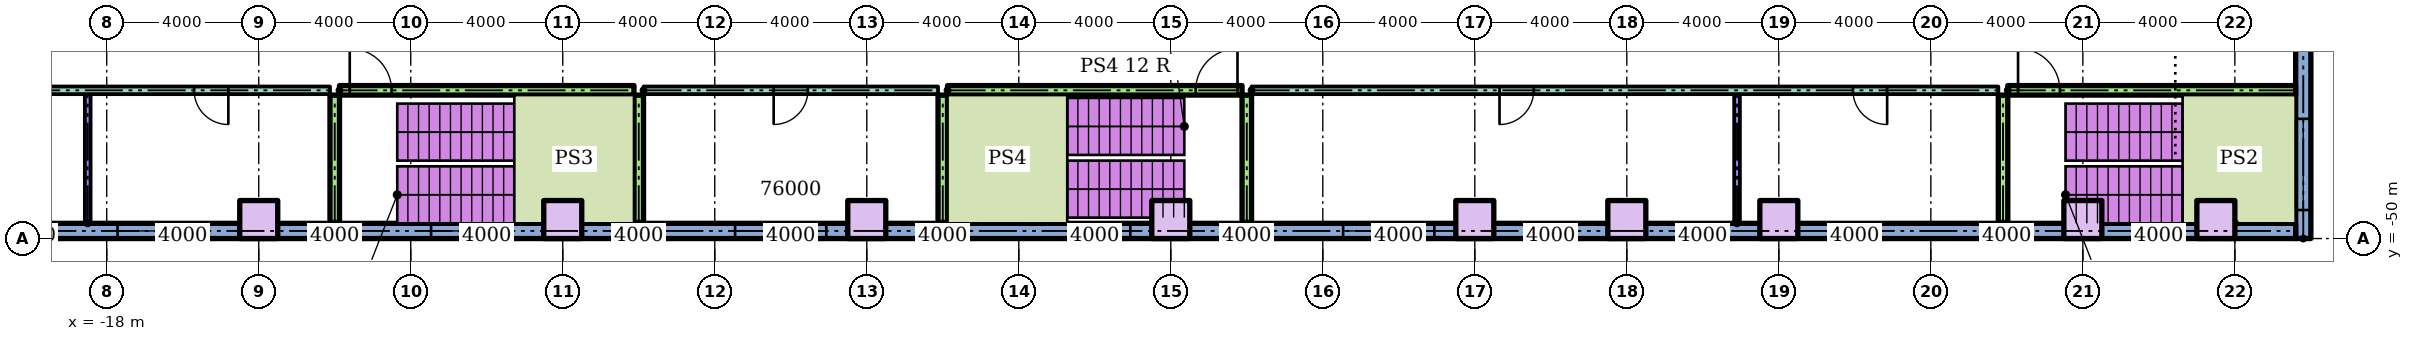
"""IFC4 building model, lengths in metres.
Left out: names, types, materials, properties, quantities, classifications, styles, units other than length and angle.
Written with IfcOpenShell. Run it as: python <this file> out.ifc"""

import sys

from ifc_helpers import new_model, si_unit, direction, frame, frame_2d, origin, origin_2d, place, context, subcontext, project, spatial, rectangle, extrude, element, fill, save


model = new_model("IFC4")
c1 = context("Model", 3, precision=1e-05, world=origin(), true_north=direction((0.0, 1.0)))
c2 = subcontext(c1, "Body", "Model", "MODEL_VIEW")
j1 = project(units=[si_unit("LENGTHUNIT", "METRE"), si_unit("PLANEANGLEUNIT", "RADIAN")], contexts=[c1])
p1 = place(None, origin())
s1 = spatial("IfcSite", under=j1, at=p1, CompositionType="ELEMENT")
p2 = place(p1, origin())
s2 = spatial("IfcBuilding", under=s1, at=p2, CompositionType="ELEMENT")
p3 = place(p2, frame((0.0, 0.0, 14.0)))
s3 = spatial("IfcBuildingStorey", under=s2, at=p3, CompositionType="ELEMENT", Elevation=14.0)
for number, where in (
    (1, (-14.0, -49.5, 0.0)),
    (2, (-6.0, -49.5, 0.0)),
    (3, (2.0, -49.5, 0.0)),
    (4, (10.0, -49.5, 0.0)),
    (5, (18.0, -49.5, 0.0)),
    (6, (22.0, -49.5, 0.0)),
    (7, (26.0, -49.5, 0.0)),
    (8, (34.0, -49.5, 0.0)),
    (9, (37.5, -49.5, 0.0)),
):
    element("IfcColumn", number, at=place(p3, frame(where)), inside=s3, PredefinedType="COLUMN", context=c2, shape_type="SweptSolid", body=[
        extrude(rectangle(XDim=1.0, YDim=1.0, at=origin_2d()), origin(), (0.0, 0.0, 1.0), 4.0),
    ])
p4 = place(p3, frame((39.8, -50.0, 0.0), z_axis=(0.0, 0.0, 1.0), x_axis=(0.0, 1.0, 0.0)))
e10 = element("IfcWall", 10, at=p4, inside=s3, PredefinedType="STANDARD", context=c2, shape_type="SweptSolid", body=[
    extrude(rectangle(XDim=70.0, YDim=0.4, at=frame_2d((35.0, 0.0))), origin(), (0.0, 0.0, 1.0), 3.7),
])
p5 = place(p4, frame((0.75, 0.0, 0.9)))
e11 = element("IfcOpeningElement", 11, at=p5, cuts=e10, PredefinedType="OPENING", context=c2, shape_type="SweptSolid", body=[
    extrude(rectangle(XDim=2.4, YDim=2.1, at=frame_2d((1.2, 1.05))), frame((0.0, 0.21, 0.0), z_axis=(0.0, -1.0, 0.0), x_axis=(1.0, 0.0, 0.0)), (0.0, 0.0, 1.0), 0.42),
])
p6 = place(p4, frame((28.863, 0.0, 0.9)))
e12 = element("IfcOpeningElement", 12, at=p6, cuts=e10, PredefinedType="OPENING", context=c2, shape_type="SweptSolid", body=[
    extrude(rectangle(XDim=2.4, YDim=2.1, at=frame_2d((1.2, 1.05))), frame((0.0, 0.21, 0.0), z_axis=(0.0, -1.0, 0.0), x_axis=(1.0, 0.0, 0.0)), (0.0, 0.0, 1.0), 0.42),
])
p7 = place(p4, frame((32.988, 0.0, 0.9)))
e13 = element("IfcOpeningElement", 13, at=p7, cuts=e10, PredefinedType="OPENING", context=c2, shape_type="SweptSolid", body=[
    extrude(rectangle(XDim=2.4, YDim=2.1, at=frame_2d((1.2, 1.05))), frame((0.0, 0.21, 0.0), z_axis=(0.0, -1.0, 0.0), x_axis=(1.0, 0.0, 0.0)), (0.0, 0.0, 1.0), 0.42),
])
p8 = place(p4, frame((37.113, 0.0, 0.9)))
e14 = element("IfcOpeningElement", 14, at=p8, cuts=e10, PredefinedType="OPENING", context=c2, shape_type="SweptSolid", body=[
    extrude(rectangle(XDim=2.4, YDim=2.1, at=frame_2d((1.2, 1.05))), frame((0.0, 0.21, 0.0), z_axis=(0.0, -1.0, 0.0), x_axis=(1.0, 0.0, 0.0)), (0.0, 0.0, 1.0), 0.42),
])
p9 = place(p4, frame((41.238, 0.0, 0.9)))
e15 = element("IfcOpeningElement", 15, at=p9, cuts=e10, PredefinedType="OPENING", context=c2, shape_type="SweptSolid", body=[
    extrude(rectangle(XDim=2.4, YDim=2.1, at=frame_2d((1.2, 1.05))), frame((0.0, 0.21, 0.0), z_axis=(0.0, -1.0, 0.0), x_axis=(1.0, 0.0, 0.0)), (0.0, 0.0, 1.0), 0.42),
])
p10 = place(p4, frame((45.363, 0.0, 0.9)))
e16 = element("IfcOpeningElement", 16, at=p10, cuts=e10, PredefinedType="OPENING", context=c2, shape_type="SweptSolid", body=[
    extrude(rectangle(XDim=2.4, YDim=2.1, at=frame_2d((1.2, 1.05))), frame((0.0, 0.21, 0.0), z_axis=(0.0, -1.0, 0.0), x_axis=(1.0, 0.0, 0.0)), (0.0, 0.0, 1.0), 0.42),
])
p11 = place(p4, frame((49.488, 0.0, 0.9)))
e17 = element("IfcOpeningElement", 17, at=p11, cuts=e10, PredefinedType="OPENING", context=c2, shape_type="SweptSolid", body=[
    extrude(rectangle(XDim=2.4, YDim=2.1, at=frame_2d((1.2, 1.05))), frame((0.0, 0.21, 0.0), z_axis=(0.0, -1.0, 0.0), x_axis=(1.0, 0.0, 0.0)), (0.0, 0.0, 1.0), 0.42),
])
p12 = place(p4, frame((53.613, 0.0, 0.9)))
e18 = element("IfcOpeningElement", 18, at=p12, cuts=e10, PredefinedType="OPENING", context=c2, shape_type="SweptSolid", body=[
    extrude(rectangle(XDim=2.4, YDim=2.1, at=frame_2d((1.2, 1.05))), frame((0.0, 0.21, 0.0), z_axis=(0.0, -1.0, 0.0), x_axis=(1.0, 0.0, 0.0)), (0.0, 0.0, 1.0), 0.42),
])
p13 = place(p4, frame((57.738, 0.0, 0.9)))
e19 = element("IfcOpeningElement", 19, at=p13, cuts=e10, PredefinedType="OPENING", context=c2, shape_type="SweptSolid", body=[
    extrude(rectangle(XDim=2.4, YDim=2.1, at=frame_2d((1.2, 1.05))), frame((0.0, 0.21, 0.0), z_axis=(0.0, -1.0, 0.0), x_axis=(1.0, 0.0, 0.0)), (0.0, 0.0, 1.0), 0.42),
])
p14 = place(p4, frame((62.05, 0.0, 0.9)))
e20 = element("IfcOpeningElement", 20, at=p14, cuts=e10, PredefinedType="OPENING", context=c2, shape_type="SweptSolid", body=[
    extrude(rectangle(XDim=2.4, YDim=2.1, at=frame_2d((1.2, 1.05))), frame((0.0, 0.21, 0.0), z_axis=(0.0, -1.0, 0.0), x_axis=(1.0, 0.0, 0.0)), (0.0, 0.0, 1.0), 0.42),
])
p15 = place(p4, frame((66.55, 0.0, 0.9)))
e21 = element("IfcOpeningElement", 21, at=p15, cuts=e10, PredefinedType="OPENING", context=c2, shape_type="SweptSolid", body=[
    extrude(rectangle(XDim=2.4, YDim=2.1, at=frame_2d((1.2, 1.05))), frame((0.0, 0.21, 0.0), z_axis=(0.0, -1.0, 0.0), x_axis=(1.0, 0.0, 0.0)), (0.0, 0.0, 1.0), 0.42),
])
p16 = place(p3, frame((-39.6, -49.8, 0.0)))
e22 = element("IfcWall", 22, at=p16, inside=s3, PredefinedType="STANDARD", context=c2, shape_type="SweptSolid", body=[
    extrude(rectangle(XDim=79.2, YDim=0.4, at=frame_2d((39.6, 0.0))), origin(), (0.0, 0.0, 1.0), 3.7),
])
p17 = place(p16, frame((21.885, 0.0, 0.9)))
e23 = element("IfcOpeningElement", 23, at=p17, cuts=e22, PredefinedType="OPENING", context=c2, shape_type="SweptSolid", body=[
    extrude(rectangle(XDim=2.4, YDim=2.1, at=frame_2d((1.2, 1.05))), frame((0.0, 0.21, 0.0), z_axis=(0.0, -1.0, 0.0), x_axis=(1.0, 0.0, 0.0)), (0.0, 0.0, 1.0), 0.42),
])
p18 = place(p16, frame((30.135, 0.0, 0.9)))
e24 = element("IfcOpeningElement", 24, at=p18, cuts=e22, PredefinedType="OPENING", context=c2, shape_type="SweptSolid", body=[
    extrude(rectangle(XDim=2.05, YDim=2.1, at=frame_2d((1.025, 1.05))), frame((0.0, 0.21, 0.0), z_axis=(0.0, -1.0, 0.0), x_axis=(1.0, 0.0, 0.0)), (0.0, 0.0, 1.0), 0.42),
])
p19 = place(p16, frame((38.135, 0.0, 0.9)))
e25 = element("IfcOpeningElement", 25, at=p19, cuts=e22, PredefinedType="OPENING", context=c2, shape_type="SweptSolid", body=[
    extrude(rectangle(XDim=2.4, YDim=2.1, at=frame_2d((1.2, 1.05))), frame((0.0, 0.21, 0.0), z_axis=(0.0, -1.0, 0.0), x_axis=(1.0, 0.0, 0.0)), (0.0, 0.0, 1.0), 0.42),
])
p20 = place(p16, frame((47.015, 0.0, 0.9)))
e26 = element("IfcOpeningElement", 26, at=p20, cuts=e22, PredefinedType="OPENING", context=c2, shape_type="SweptSolid", body=[
    extrude(rectangle(XDim=1.52, YDim=2.1, at=frame_2d((0.76, 1.05))), frame((0.0, 0.21, 0.0), z_axis=(0.0, -1.0, 0.0), x_axis=(1.0, 0.0, 0.0)), (0.0, 0.0, 1.0), 0.42),
])
p21 = place(p16, frame((54.135, 0.0, 0.9)))
e27 = element("IfcOpeningElement", 27, at=p21, cuts=e22, PredefinedType="OPENING", context=c2, shape_type="SweptSolid", body=[
    extrude(rectangle(XDim=2.4, YDim=2.1, at=frame_2d((1.2, 1.05))), frame((0.0, 0.21, 0.0), z_axis=(0.0, -1.0, 0.0), x_axis=(1.0, 0.0, 0.0)), (0.0, 0.0, 1.0), 0.42),
])
p22 = place(p3, frame((-31.775, -46.1, 0.0)))
e28 = element("IfcWall", 28, at=p22, inside=s3, PredefinedType="PARTITIONING", context=c2, shape_type="SweptSolid", body=[
    extrude(rectangle(XDim=19.65, YDim=0.2, at=frame_2d((9.825, 0.0))), origin(), (0.0, 0.0, 1.0), 3.7),
])
p23 = place(p22, frame((2.875, 0.0, 0.0)))
e29 = element("IfcOpeningElement", 29, at=p23, cuts=e28, PredefinedType="OPENING", context=c2, shape_type="SweptSolid", body=[
    extrude(rectangle(XDim=0.9, YDim=2.1, at=frame_2d((0.45, 1.05))), frame((0.0, 0.11, 0.0), z_axis=(0.0, -1.0, 0.0), x_axis=(1.0, 0.0, 0.0)), (0.0, 0.0, 1.0), 0.22),
])
p24 = place(p22, frame((10.425, 0.0, 0.0)))
e30 = element("IfcOpeningElement", 30, at=p24, cuts=e28, PredefinedType="OPENING", context=c2, shape_type="SweptSolid", body=[
    extrude(rectangle(XDim=0.9, YDim=2.1, at=frame_2d((0.45, 1.05))), frame((0.0, 0.11, 0.0), z_axis=(0.0, -1.0, 0.0), x_axis=(1.0, 0.0, 0.0)), (0.0, 0.0, 1.0), 0.22),
])
p25 = place(p22, frame((16.075, 0.0, 0.0)))
e31 = element("IfcOpeningElement", 31, at=p25, cuts=e28, PredefinedType="OPENING", context=c2, shape_type="SweptSolid", body=[
    extrude(rectangle(XDim=0.9, YDim=2.1, at=frame_2d((0.45, 1.05))), frame((0.0, 0.11, 0.0), z_axis=(0.0, -1.0, 0.0), x_axis=(1.0, 0.0, 0.0)), (0.0, 0.0, 1.0), 0.22),
])
p26 = place(p3, frame((-3.875, -46.1, 0.0)))
e32 = element("IfcWall", 32, at=p26, inside=s3, PredefinedType="PARTITIONING", context=c2, shape_type="SweptSolid", body=[
    extrude(rectangle(XDim=7.75, YDim=0.2, at=frame_2d((3.875, 0.0))), origin(), (0.0, 0.0, 1.0), 3.7),
])
p27 = place(p26, frame((3.425, 0.0, 0.0)))
e33 = element("IfcOpeningElement", 33, at=p27, cuts=e32, PredefinedType="OPENING", context=c2, shape_type="SweptSolid", body=[
    extrude(rectangle(XDim=0.9, YDim=2.1, at=frame_2d((0.45, 1.05))), frame((0.0, 0.11, 0.0), z_axis=(0.0, -1.0, 0.0), x_axis=(1.0, 0.0, 0.0)), (0.0, 0.0, 1.0), 0.22),
])
p28 = place(p3, frame((12.125, -46.1, 0.0)))
e34 = element("IfcWall", 34, at=p28, inside=s3, PredefinedType="PARTITIONING", context=c2, shape_type="SweptSolid", body=[
    extrude(rectangle(XDim=19.65, YDim=0.2, at=frame_2d((9.825, 0.0))), origin(), (0.0, 0.0, 1.0), 3.7),
])
p29 = place(p28, frame((6.525, 0.0, 0.0)))
e35 = element("IfcOpeningElement", 35, at=p29, cuts=e34, PredefinedType="OPENING", context=c2, shape_type="SweptSolid", body=[
    extrude(rectangle(XDim=0.9, YDim=2.1, at=frame_2d((0.45, 1.05))), frame((0.0, 0.11, 0.0), z_axis=(0.0, -1.0, 0.0), x_axis=(1.0, 0.0, 0.0)), (0.0, 0.0, 1.0), 0.22),
])
p30 = place(p28, frame((15.825, 0.0, 0.0)))
e36 = element("IfcOpeningElement", 36, at=p30, cuts=e34, PredefinedType="OPENING", context=c2, shape_type="SweptSolid", body=[
    extrude(rectangle(XDim=0.9, YDim=2.1, at=frame_2d((0.45, 1.05))), frame((0.0, 0.11, 0.0), z_axis=(0.0, -1.0, 0.0), x_axis=(1.0, 0.0, 0.0)), (0.0, 0.0, 1.0), 0.22),
])
p31 = place(p3, frame((-11.875, -46.1, 0.0)))
e37 = element("IfcWall", 37, at=p31, inside=s3, PredefinedType="SOLIDWALL", context=c2, shape_type="SweptSolid", body=[
    extrude(rectangle(XDim=7.75, YDim=0.25, at=frame_2d((3.875, 0.0))), origin(), (0.0, 0.0, 1.0), 3.7),
])
p32 = place(p31, frame((0.27, 0.0, 0.0)))
e38 = element("IfcOpeningElement", 38, at=p32, cuts=e37, PredefinedType="OPENING", context=c2, shape_type="SweptSolid", body=[
    extrude(rectangle(XDim=1.1, YDim=2.1, at=frame_2d((0.55, 1.05))), frame((0.0, 0.135, 0.0), z_axis=(0.0, -1.0, 0.0), x_axis=(1.0, 0.0, 0.0)), (0.0, 0.0, 1.0), 0.27),
])
p33 = place(p3, frame((4.125, -46.1, 0.0)))
e39 = element("IfcWall", 39, at=p33, inside=s3, PredefinedType="SOLIDWALL", context=c2, shape_type="SweptSolid", body=[
    extrude(rectangle(XDim=7.75, YDim=0.25, at=frame_2d((3.875, 0.0))), origin(), (0.0, 0.0, 1.0), 3.7),
])
p34 = place(p33, frame((6.53, 0.0, 0.0)))
e40 = element("IfcOpeningElement", 40, at=p34, cuts=e39, PredefinedType="OPENING", context=c2, shape_type="SweptSolid", body=[
    extrude(rectangle(XDim=1.1, YDim=2.1, at=frame_2d((0.55, 1.05))), frame((0.0, 0.135, 0.0), z_axis=(0.0, -1.0, 0.0), x_axis=(1.0, 0.0, 0.0)), (0.0, 0.0, 1.0), 0.27),
])
p35 = place(p3, frame((32.025, -46.1, 0.0)))
e41 = element("IfcWall", 41, at=p35, inside=s3, PredefinedType="SOLIDWALL", context=c2, shape_type="SweptSolid", body=[
    extrude(rectangle(XDim=7.575, YDim=0.25, at=frame_2d((3.788, 0.0))), origin(), (0.0, 0.0, 1.0), 3.7),
])
p36 = place(p35, frame((0.27, 0.0, 0.0)))
e42 = element("IfcOpeningElement", 42, at=p36, cuts=e41, PredefinedType="OPENING", context=c2, shape_type="SweptSolid", body=[
    extrude(rectangle(XDim=1.1, YDim=2.1, at=frame_2d((0.55, 1.05))), frame((0.0, 0.135, 0.0), z_axis=(0.0, -1.0, 0.0), x_axis=(1.0, 0.0, 0.0)), (0.0, 0.0, 1.0), 0.27),
])
p37 = place(p3, frame((-18.5, -49.6, 0.0), z_axis=(0.0, 0.0, 1.0), x_axis=(0.0, 1.0, 0.0)))
e43 = element("IfcWall", 43, at=p37, inside=s3, PredefinedType="PARTITIONING", context=c2, shape_type="SweptSolid", body=[
    extrude(rectangle(XDim=3.4, YDim=0.15, at=frame_2d((1.7, 0.0))), origin(), (0.0, 0.0, 1.0), 3.7),
])
for number, where, z_axis, x_axis in (
    (44, (-12.0, -49.6, 0.0), (0.0, 0.0, 1.0), (0.0, 1.0, 0.0)),
    (45, (-4.0, -49.6, 0.0), (0.0, 0.0, 1.0), (0.0, 1.0, 0.0)),
    (46, (4.0, -49.6, 0.0), (0.0, 0.0, 1.0), (0.0, 1.0, 0.0)),
    (47, (12.0, -49.6, 0.0), (0.0, 0.0, 1.0), (0.0, 1.0, 0.0)),
):
    element("IfcWall", number, at=place(p3, frame(where, z_axis=z_axis, x_axis=x_axis)), inside=s3, PredefinedType="SOLIDWALL", context=c2, shape_type="SweptSolid", body=[
        extrude(rectangle(XDim=3.375, YDim=0.25, at=frame_2d((1.688, 0.0))), origin(), (0.0, 0.0, 1.0), 3.7),
    ])
p38 = place(p3, frame((24.9, -49.6, 0.0), z_axis=(0.0, 0.0, 1.0), x_axis=(0.0, 1.0, 0.0)))
e48 = element("IfcWall", 48, at=p38, inside=s3, PredefinedType="PARTITIONING", context=c2, shape_type="SweptSolid", body=[
    extrude(rectangle(XDim=3.4, YDim=0.15, at=frame_2d((1.7, 0.0))), origin(), (0.0, 0.0, 1.0), 3.7),
])
p39 = place(p3, frame((31.9, -49.6, 0.0), z_axis=(0.0, 0.0, 1.0), x_axis=(0.0, 1.0, 0.0)))
e49 = element("IfcWall", 49, at=p39, inside=s3, PredefinedType="SOLIDWALL", context=c2, shape_type="SweptSolid", body=[
    extrude(rectangle(XDim=3.375, YDim=0.25, at=frame_2d((1.688, 0.0))), origin(), (0.0, 0.0, 1.0), 3.7),
])
p40 = place(p5, origin())
e50 = element("IfcWindow", 50, at=p40, inside=s3, PartitioningType="SINGLE_PANEL", PredefinedType="WINDOW", context=c2, shape_type="SweptSolid", body=[
    extrude(rectangle(XDim=2.4, YDim=2.1, at=frame_2d((1.2, 1.05))), frame((0.0, 0.03, 0.0), z_axis=(0.0, -1.0, 0.0), x_axis=(1.0, 0.0, 0.0)), (0.0, 0.0, 1.0), 0.06),
])
fill(e11, e50)
p41 = place(p17, origin())
e51 = element("IfcWindow", 51, at=p41, inside=s3, PartitioningType="SINGLE_PANEL", PredefinedType="WINDOW", context=c2, shape_type="SweptSolid", body=[
    extrude(rectangle(XDim=2.4, YDim=2.1, at=frame_2d((1.2, 1.05))), frame((0.0, 0.03, 0.0), z_axis=(0.0, -1.0, 0.0), x_axis=(1.0, 0.0, 0.0)), (0.0, 0.0, 1.0), 0.06),
])
fill(e23, e51)
p42 = place(p18, origin())
e52 = element("IfcWindow", 52, at=p42, inside=s3, PartitioningType="SINGLE_PANEL", PredefinedType="WINDOW", context=c2, shape_type="SweptSolid", body=[
    extrude(rectangle(XDim=2.05, YDim=2.1, at=frame_2d((1.025, 1.05))), frame((0.0, 0.03, 0.0), z_axis=(0.0, -1.0, 0.0), x_axis=(1.0, 0.0, 0.0)), (0.0, 0.0, 1.0), 0.06),
])
fill(e24, e52)
p43 = place(p19, origin())
e53 = element("IfcWindow", 53, at=p43, inside=s3, PartitioningType="SINGLE_PANEL", PredefinedType="WINDOW", context=c2, shape_type="SweptSolid", body=[
    extrude(rectangle(XDim=2.4, YDim=2.1, at=frame_2d((1.2, 1.05))), frame((0.0, 0.03, 0.0), z_axis=(0.0, -1.0, 0.0), x_axis=(1.0, 0.0, 0.0)), (0.0, 0.0, 1.0), 0.06),
])
fill(e25, e53)
p44 = place(p20, origin())
e54 = element("IfcWindow", 54, at=p44, inside=s3, PartitioningType="SINGLE_PANEL", PredefinedType="WINDOW", context=c2, shape_type="SweptSolid", body=[
    extrude(rectangle(XDim=1.52, YDim=2.1, at=frame_2d((0.76, 1.05))), frame((0.0, 0.03, 0.0), z_axis=(0.0, -1.0, 0.0), x_axis=(1.0, 0.0, 0.0)), (0.0, 0.0, 1.0), 0.06),
])
fill(e26, e54)
p45 = place(p21, origin())
e55 = element("IfcWindow", 55, at=p45, inside=s3, PartitioningType="SINGLE_PANEL", PredefinedType="WINDOW", context=c2, shape_type="SweptSolid", body=[
    extrude(rectangle(XDim=2.4, YDim=2.1, at=frame_2d((1.2, 1.05))), frame((0.0, 0.03, 0.0), z_axis=(0.0, -1.0, 0.0), x_axis=(1.0, 0.0, 0.0)), (0.0, 0.0, 1.0), 0.06),
])
fill(e27, e55)
p46 = place(p25, frame((0.9, 0.0, 0.0), z_axis=(0.0, 0.0, 1.0), x_axis=(-1.0, 0.0, 0.0)))
e56 = element("IfcDoor", 56, at=p46, inside=s3, OperationType="SINGLE_SWING_RIGHT", PredefinedType="DOOR", context=c2, shape_type="SweptSolid", body=[
    extrude(rectangle(XDim=0.9, YDim=2.1, at=frame_2d((0.45, 1.05))), frame((0.0, 0.025, 0.0), z_axis=(0.0, -1.0, 0.0), x_axis=(1.0, 0.0, 0.0)), (0.0, 0.0, 1.0), 0.05),
])
fill(e31, e56)
p47 = place(p27, frame((0.9, 0.0, 0.0), z_axis=(0.0, 0.0, 1.0), x_axis=(-1.0, 0.0, 0.0)))
e57 = element("IfcDoor", 57, at=p47, inside=s3, OperationType="SINGLE_SWING_LEFT", PredefinedType="DOOR", context=c2, shape_type="SweptSolid", body=[
    extrude(rectangle(XDim=0.9, YDim=2.1, at=frame_2d((0.45, 1.05))), frame((0.0, 0.025, 0.0), z_axis=(0.0, -1.0, 0.0), x_axis=(1.0, 0.0, 0.0)), (0.0, 0.0, 1.0), 0.05),
])
fill(e33, e57)
p48 = place(p29, frame((0.9, 0.0, 0.0), z_axis=(0.0, 0.0, 1.0), x_axis=(-1.0, 0.0, 0.0)))
e58 = element("IfcDoor", 58, at=p48, inside=s3, OperationType="SINGLE_SWING_LEFT", PredefinedType="DOOR", context=c2, shape_type="SweptSolid", body=[
    extrude(rectangle(XDim=0.9, YDim=2.1, at=frame_2d((0.45, 1.05))), frame((0.0, 0.025, 0.0), z_axis=(0.0, -1.0, 0.0), x_axis=(1.0, 0.0, 0.0)), (0.0, 0.0, 1.0), 0.05),
])
fill(e35, e58)
p49 = place(p30, frame((0.9, 0.0, 0.0), z_axis=(0.0, 0.0, 1.0), x_axis=(-1.0, 0.0, 0.0)))
e59 = element("IfcDoor", 59, at=p49, inside=s3, OperationType="SINGLE_SWING_RIGHT", PredefinedType="DOOR", context=c2, shape_type="SweptSolid", body=[
    extrude(rectangle(XDim=0.9, YDim=2.1, at=frame_2d((0.45, 1.05))), frame((0.0, 0.025, 0.0), z_axis=(0.0, -1.0, 0.0), x_axis=(1.0, 0.0, 0.0)), (0.0, 0.0, 1.0), 0.05),
])
fill(e36, e59)
p50 = place(p36, origin())
e60 = element("IfcDoor", 60, at=p50, inside=s3, OperationType="SINGLE_SWING_LEFT", PredefinedType="DOOR", context=c2, shape_type="SweptSolid", body=[
    extrude(rectangle(XDim=1.1, YDim=2.1, at=frame_2d((0.55, 1.05))), frame((0.0, 0.025, 0.0), z_axis=(0.0, -1.0, 0.0), x_axis=(1.0, 0.0, 0.0)), (0.0, 0.0, 1.0), 0.05),
])
fill(e42, e60)
p51 = place(p32, origin())
e61 = element("IfcDoor", 61, at=p51, inside=s3, OperationType="SINGLE_SWING_LEFT", PredefinedType="DOOR", context=c2, shape_type="SweptSolid", body=[
    extrude(rectangle(XDim=1.1, YDim=2.1, at=frame_2d((0.55, 1.05))), frame((0.0, 0.025, 0.0), z_axis=(0.0, -1.0, 0.0), x_axis=(1.0, 0.0, 0.0)), (0.0, 0.0, 1.0), 0.05),
])
fill(e38, e61)
p52 = place(p34, origin())
e62 = element("IfcDoor", 62, at=p52, inside=s3, OperationType="SINGLE_SWING_RIGHT", PredefinedType="DOOR", context=c2, shape_type="SweptSolid", body=[
    extrude(rectangle(XDim=1.1, YDim=2.1, at=frame_2d((0.55, 1.05))), frame((0.0, 0.025, 0.0), z_axis=(0.0, -1.0, 0.0), x_axis=(1.0, 0.0, 0.0)), (0.0, 0.0, 1.0), 0.05),
])
fill(e40, e62)
save(model, sys.argv[1])
